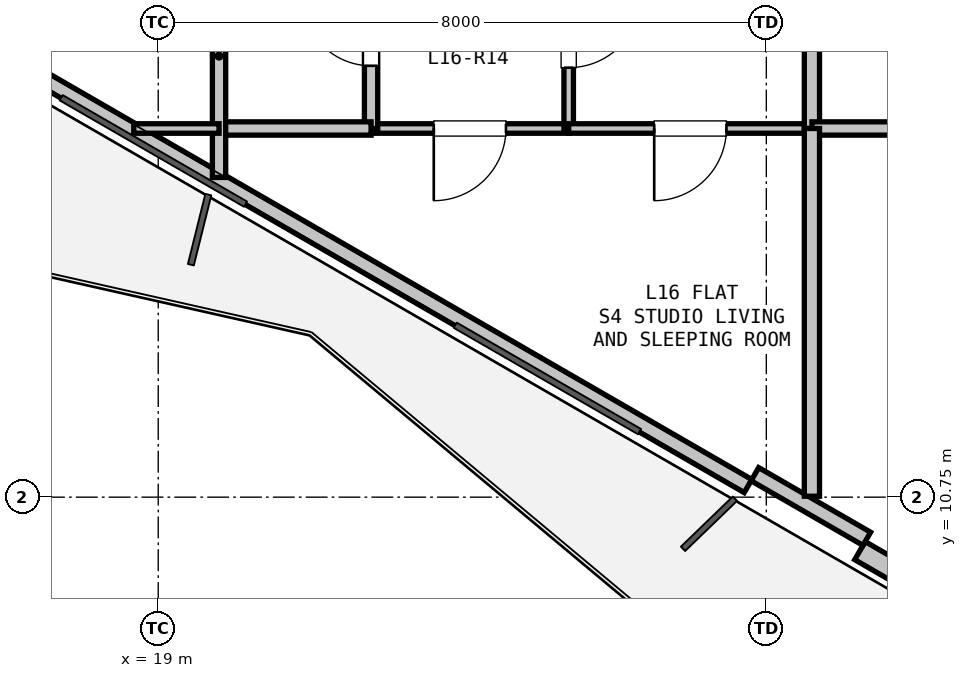
"""IFC4 building model, lengths in metres.
Left out: names, types, materials, properties, quantities, classifications, styles, units other than length and angle.
Written with IfcOpenShell. Run it as: python <this file> out.ifc"""

import sys

from ifc_helpers import new_model, si_unit, direction, frame, frame_2d, origin, place, context, subcontext, project, spatial, rectangle, extrude, element, fill, save


model = new_model("IFC4")
c1 = context("Model", 3, precision=1e-05, world=origin(), true_north=direction((0.0, 1.0)))
c2 = subcontext(c1, "Body", "Model", "MODEL_VIEW")
j1 = project(units=[si_unit("LENGTHUNIT", "METRE"), si_unit("PLANEANGLEUNIT", "RADIAN")], contexts=[c1])
p1 = place(None, origin())
s1 = spatial("IfcSite", under=j1, at=p1, CompositionType="ELEMENT")
p2 = place(p1, origin())
s2 = spatial("IfcBuilding", under=s1, at=p2, CompositionType="ELEMENT")
p3 = place(p2, frame((0.0, 0.0, 58.8)))
s3 = spatial("IfcBuildingStorey", under=s2, at=p3, CompositionType="ELEMENT", Elevation=58.8)
p4 = place(p3, frame((39.207, 3.71, 0.0), z_axis=(0.0, 0.0, 1.0), x_axis=(-0.86603192154, 0.499988710747, 0.0)))
e1 = element("IfcWall", 1, at=p4, inside=s3, PredefinedType="SOLIDWALL", context=c2, shape_type="SweptSolid", body=[
    extrude(rectangle(XDim=12.673, YDim=0.275, at=frame_2d((6.336, 0.0))), origin(), (0.0, 0.0, 1.0), 2.64),
])
p5 = place(p4, frame((8.136, 0.0, 0.0)))
e2 = element("IfcOpeningElement", 2, at=p5, cuts=e1, PredefinedType="OPENING", context=c2, shape_type="SweptSolid", body=[
    extrude(rectangle(XDim=1.1, YDim=2.1, at=frame_2d((0.55, 1.05))), frame((0.0, 0.147, 0.0), z_axis=(0.0, -1.0, 0.0), x_axis=(1.0, 0.0, 0.0)), (0.0, 0.0, 1.0), 0.295),
])
p6 = place(p4, frame((2.971, 0.0, 0.9)))
e3 = element("IfcOpeningElement", 3, at=p6, cuts=e1, PredefinedType="OPENING", context=c2, shape_type="SweptSolid", body=[
    extrude(rectangle(XDim=1.2, YDim=1.4, at=frame_2d((0.6, 0.7))), frame((0.0, 0.147, 0.0), z_axis=(0.0, -1.0, 0.0), x_axis=(1.0, 0.0, 0.0)), (0.0, 0.0, 1.0), 0.295),
])
p7 = place(p3, frame((26.76, 10.896, 0.0), z_axis=(0.0, 0.0, 1.0), x_axis=(-0.866027351828, 0.499996625875, 0.0)))
e4 = element("IfcWall", 4, at=p7, inside=s3, PredefinedType="PARAPET", context=c2, shape_type="SweptSolid", body=[
    extrude(rectangle(XDim=11.973, YDim=0.2, at=frame_2d((5.987, 0.0))), origin(), (0.0, 0.0, 1.0), 0.2),
])
p8 = place(p3, frame((28.322, 10.202, 0.0), z_axis=(0.0, 0.0, 1.0), x_axis=(-0.86605165483, 0.499954529098, 0.0)))
e5 = element("IfcWall", 5, at=p8, inside=s3, PredefinedType="PARAPET", context=c2, shape_type="SweptSolid", body=[
    extrude(rectangle(XDim=1.7, YDim=0.2, at=frame_2d((0.85, 0.0))), origin(), (0.0, 0.0, 1.0), 2.64),
])
p9 = place(p3, frame((24.4, 15.6, 0.0), z_axis=(0.0, 0.0, 1.0), x_axis=(-1.0, 0.0, 0.0)))
e6 = element("IfcWall", 6, at=p9, inside=s3, PredefinedType="PARTITIONING", context=c2, shape_type="SweptSolid", body=[
    extrude(rectangle(XDim=2.6, YDim=0.125, at=frame_2d((1.3, 0.0))), origin(), (0.0, 0.0, 1.0), 3.02),
])
p10 = place(p9, frame((0.825, 0.0, 0.0)))
e7 = element("IfcOpeningElement", 7, at=p10, cuts=e6, PredefinedType="OPENING", context=c2, shape_type="SweptSolid", body=[
    extrude(rectangle(XDim=0.95, YDim=2.1, at=frame_2d((0.475, 1.05))), frame((0.0, 0.073, 0.0), z_axis=(0.0, -1.0, 0.0), x_axis=(1.0, 0.0, 0.0)), (0.0, 0.0, 1.0), 0.145),
])
p11 = place(p3, frame((21.8, 15.6, 0.0), z_axis=(0.0, 0.0, 1.0), x_axis=(0.0, 1.0, 0.0)))
e8 = element("IfcWall", 8, at=p11, inside=s3, PredefinedType="PLUMBINGWALL", context=c2, shape_type="SweptSolid", body=[
    extrude(rectangle(XDim=2.55, YDim=0.175, at=frame_2d((1.275, 0.0))), origin(), (0.0, 0.0, 1.0), 3.02),
])
p12 = place(p11, frame((0.825, 0.0, 0.0)))
e9 = element("IfcOpeningElement", 9, at=p12, cuts=e8, PredefinedType="OPENING", context=c2, shape_type="SweptSolid", body=[
    extrude(rectangle(XDim=0.9, YDim=2.1, at=frame_2d((0.45, 1.05))), frame((0.0, 0.097, 0.0), z_axis=(0.0, -1.0, 0.0), x_axis=(1.0, 0.0, 0.0)), (0.0, 0.0, 1.0), 0.195),
])
p13 = place(p3, frame((24.4, 18.15, 0.0), z_axis=(0.0, 0.0, 1.0), x_axis=(0.0, -1.0, 0.0)))
e10 = element("IfcWall", 10, at=p13, inside=s3, PredefinedType="PARTITIONING", context=c2, shape_type="SweptSolid", body=[
    extrude(rectangle(XDim=2.55, YDim=0.125, at=frame_2d((1.275, 0.0))), origin(), (0.0, 0.0, 1.0), 2.317),
])
p14 = place(p13, frame((0.8, 0.0, 0.0)))
e11 = element("IfcOpeningElement", 11, at=p14, cuts=e10, PredefinedType="OPENING", context=c2, shape_type="SweptSolid", body=[
    extrude(rectangle(XDim=0.95, YDim=2.1, at=frame_2d((0.475, 1.05))), frame((0.0, 0.073, 0.0), z_axis=(0.0, -1.0, 0.0), x_axis=(1.0, 0.0, 0.0)), (0.0, 0.0, 1.0), 0.145),
])
p15 = place(p3, frame((21.8, 15.6, 0.0), z_axis=(0.0, 0.0, 1.0), x_axis=(-1.0, 0.0, 0.0)))
e12 = element("IfcWall", 12, at=p15, inside=s3, PredefinedType="PLUMBINGWALL", context=c2, shape_type="SweptSolid", body=[
    extrude(rectangle(XDim=2.0, YDim=0.175, at=frame_2d((1.0, 0.0))), origin(), (0.0, 0.0, 1.0), 2.365),
])
p16 = place(p3, frame((19.8, 14.956, 0.0), z_axis=(0.0, 0.0, 1.0), x_axis=(0.0, 1.0, 0.0)))
e13 = element("IfcWall", 13, at=p16, inside=s3, PredefinedType="PLUMBINGWALL", context=c2, shape_type="SweptSolid", body=[
    extrude(rectangle(XDim=3.194, YDim=0.175, at=frame_2d((1.597, 0.0))), origin(), (0.0, 0.0, 1.0), 2.365),
])
p17 = place(p3, frame((27.6, 15.6, 0.0), z_axis=(0.0, 0.0, 1.0), x_axis=(-1.0, 0.0, 0.0)))
e14 = element("IfcWall", 14, at=p17, inside=s3, PredefinedType="PARTITIONING", context=c2, shape_type="SweptSolid", body=[
    extrude(rectangle(XDim=3.2, YDim=0.125, at=frame_2d((1.6, 0.0))), origin(), (0.0, 0.0, 1.0), 2.317),
])
p18 = place(p17, frame((1.125, 0.0, 0.0)))
e15 = element("IfcOpeningElement", 15, at=p18, cuts=e14, PredefinedType="OPENING", context=c2, shape_type="SweptSolid", body=[
    extrude(rectangle(XDim=0.95, YDim=2.1, at=frame_2d((0.475, 1.05))), frame((0.0, 0.073, 0.0), z_axis=(0.0, -1.0, 0.0), x_axis=(1.0, 0.0, 0.0)), (0.0, 0.0, 1.0), 0.145),
])
p19 = place(p3, frame((27.6, 18.15, 0.0), z_axis=(0.0, 0.0, 1.0), x_axis=(0.0, -1.0, 0.0)))
e16 = element("IfcWall", 16, at=p19, inside=s3, PredefinedType="PARTITIONING", context=c2, shape_type="SweptSolid", body=[
    extrude(rectangle(XDim=2.55, YDim=0.2, at=frame_2d((1.275, 0.0))), origin(), (0.0, 0.0, 1.0), 3.02),
])
p20 = place(p3, frame((29.6, 15.6, 0.0), z_axis=(0.0, 0.0, 1.0), x_axis=(-1.0, 0.0, 0.0)))
e17 = element("IfcWall", 17, at=p20, inside=s3, PredefinedType="PLUMBINGWALL", context=c2, shape_type="SweptSolid", body=[
    extrude(rectangle(XDim=2.0, YDim=0.175, at=frame_2d((1.0, 0.0))), origin(), (0.0, 0.0, 1.0), 3.02),
])
p21 = place(p3, frame((18.678, 15.6, 0.0), z_axis=(0.0, 0.0, 1.0), x_axis=(1.0, 0.0, 0.0)))
e18 = element("IfcWall", 18, at=p21, inside=s3, PredefinedType="PARTITIONING", context=c2, shape_type="SweptSolid", body=[
    extrude(rectangle(XDim=1.122, YDim=0.125, at=frame_2d((0.561, 0.0))), origin(), (0.0, 0.0, 1.0), 2.365),
])
p22 = place(p3, frame((27.6, 15.6, 0.0), z_axis=(0.0, 0.0, 1.0), x_axis=(0.0, -1.0, 0.0)))
e19 = element("IfcWall", 19, at=p22, inside=s3, PredefinedType="PARTITIONING", context=c2, shape_type="SweptSolid", body=[
    extrude(rectangle(XDim=4.838, YDim=0.2, at=frame_2d((2.419, 0.0))), origin(), (0.0, 0.0, 1.0), 2.317),
])
p23 = place(p12, origin())
e20 = element("IfcDoor", 20, at=p23, inside=s3, OperationType="SINGLE_SWING_RIGHT", PredefinedType="DOOR", context=c2, shape_type="SweptSolid", body=[
    extrude(rectangle(XDim=0.9, YDim=2.1, at=frame_2d((0.45, 1.05))), frame((0.0, 0.025, 0.0), z_axis=(0.0, -1.0, 0.0), x_axis=(1.0, 0.0, 0.0)), (0.0, 0.0, 1.0), 0.05),
])
fill(e9, e20)
p24 = place(p14, origin())
e21 = element("IfcDoor", 21, at=p24, inside=s3, OperationType="SINGLE_SWING_LEFT", PredefinedType="DOOR", context=c2, shape_type="SweptSolid", body=[
    extrude(rectangle(XDim=0.95, YDim=2.1, at=frame_2d((0.475, 1.05))), frame((0.0, 0.025, 0.0), z_axis=(0.0, -1.0, 0.0), x_axis=(1.0, 0.0, 0.0)), (0.0, 0.0, 1.0), 0.05),
])
fill(e11, e21)
p25 = place(p10, origin())
e22 = element("IfcDoor", 22, at=p25, inside=s3, OperationType="SINGLE_SWING_RIGHT", PredefinedType="DOOR", context=c2, shape_type="SweptSolid", body=[
    extrude(rectangle(XDim=0.95, YDim=2.1, at=frame_2d((0.475, 1.05))), frame((0.0, 0.025, 0.0), z_axis=(0.0, -1.0, 0.0), x_axis=(1.0, 0.0, 0.0)), (0.0, 0.0, 1.0), 0.05),
])
fill(e7, e22)
p26 = place(p18, origin())
e23 = element("IfcDoor", 23, at=p26, inside=s3, OperationType="SINGLE_SWING_RIGHT", PredefinedType="DOOR", context=c2, shape_type="SweptSolid", body=[
    extrude(rectangle(XDim=0.95, YDim=2.1, at=frame_2d((0.475, 1.05))), frame((0.0, 0.025, 0.0), z_axis=(0.0, -1.0, 0.0), x_axis=(1.0, 0.0, 0.0)), (0.0, 0.0, 1.0), 0.05),
])
fill(e15, e23)
save(model, sys.argv[1])
